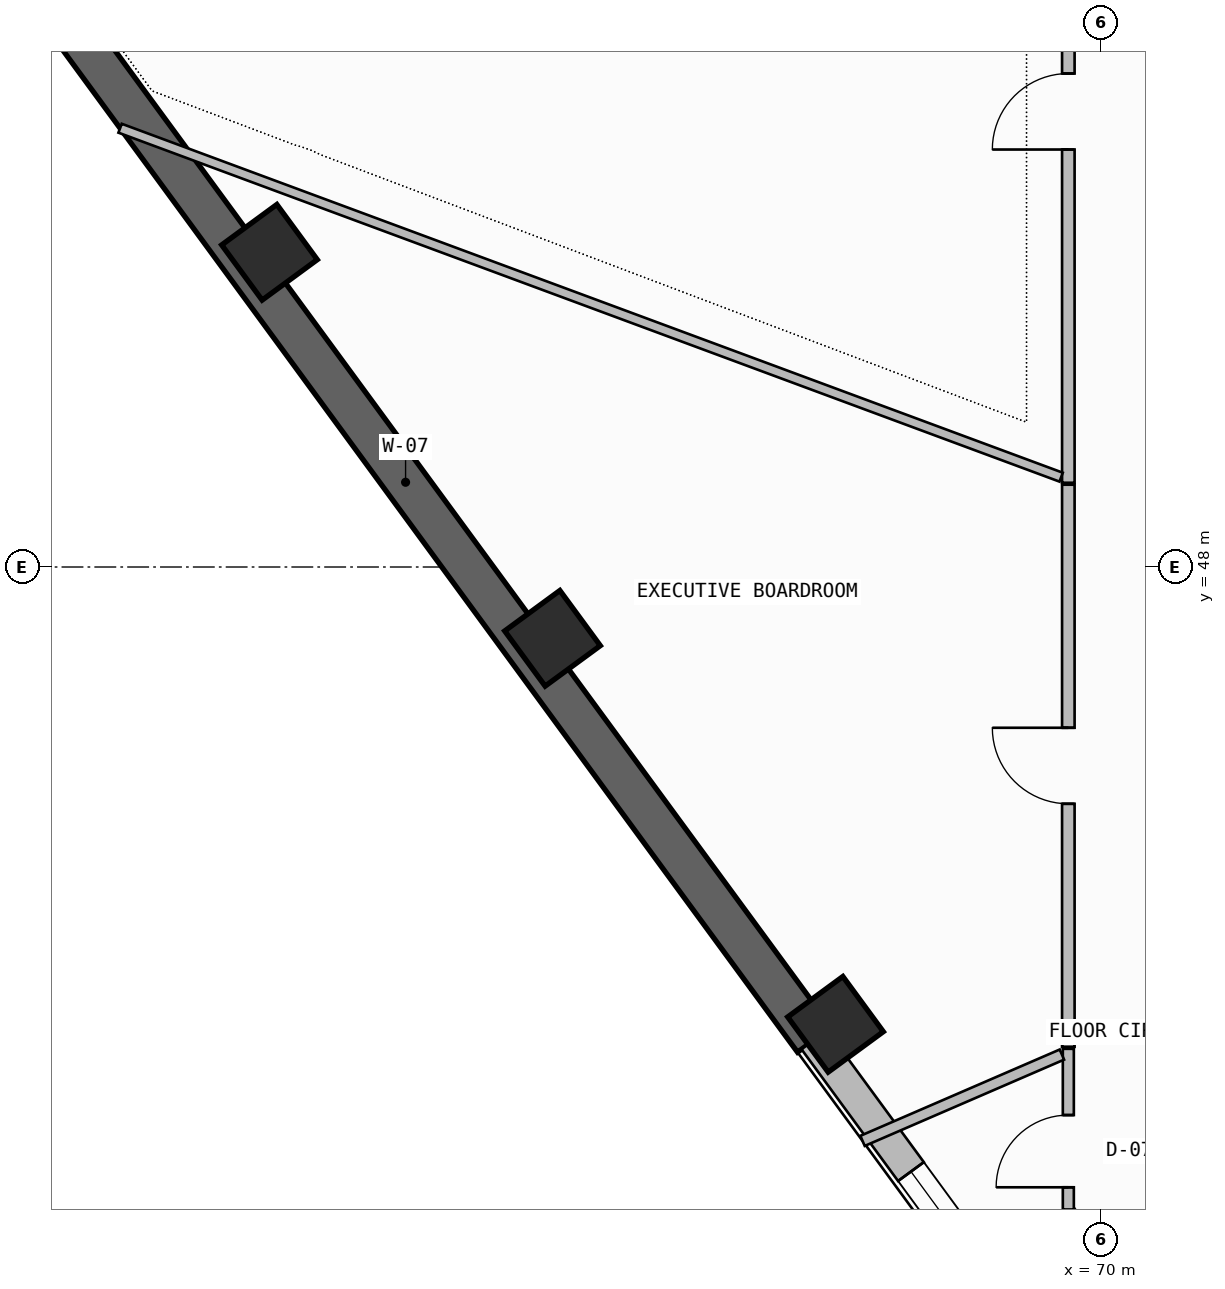
"""IFC4 building model, lengths in metres.
Left out: names, types, materials, properties, quantities, classifications, styles, units other than length and angle.
Written with IfcOpenShell. Run it as: python <this file> out.ifc"""

import sys

from ifc_helpers import new_model, si_unit, direction, frame, frame_2d, origin, origin_2d, place, context, subcontext, project, spatial, rectangle, extrude, element, fill, save


model = new_model("IFC4")
c1 = context("Model", 3, precision=1e-05, world=origin(), true_north=direction((0.0, 1.0)))
c2 = subcontext(c1, "Body", "Model", "MODEL_VIEW")
j1 = project(units=[si_unit("LENGTHUNIT", "METRE"), si_unit("PLANEANGLEUNIT", "RADIAN")], contexts=[c1])
p1 = place(None, origin())
s1 = spatial("IfcSite", under=j1, at=p1, CompositionType="ELEMENT")
p2 = place(p1, origin())
s2 = spatial("IfcBuilding", under=s1, at=p2, CompositionType="ELEMENT")
p3 = place(p2, frame((0.0, 0.0, 250.18)))
s3 = spatial("IfcBuildingStorey", under=s2, at=p3, CompositionType="ELEMENT", Elevation=250.18)
for number, where, z_axis, x_axis in (
    (1, (59.063, 52.14, 0.0), (0.0, 0.0, 1.0), (-0.591, 0.806, 0.0)),
    (2, (62.787, 47.062, 0.0), (0.0, 0.0, 1.0), (-0.591, 0.806, 0.0)),
    (3, (66.51, 41.983, 0.0), (0.0, 0.0, 1.0), (-0.591, 0.806, 0.0)),
):
    element("IfcColumn", number, at=place(p3, frame(where, z_axis=z_axis, x_axis=x_axis)), inside=s3, PredefinedType="COLUMN", context=c2, shape_type="SweptSolid", body=[
        extrude(rectangle(XDim=0.9, YDim=0.9, at=origin_2d()), origin(), (0.0, 0.0, 1.0), 3.52),
    ])
p4 = place(p3, frame((55.475, 56.45, -0.26), z_axis=(0.0, 0.0, 1.0), x_axis=(0.591309555876, -0.806444672082, 0.0)))
e4 = element("IfcWall", 4, at=p4, inside=s3, PredefinedType="SHEAR", context=c2, shape_type="SweptSolid", body=[
    extrude(rectangle(XDim=18.192, YDim=0.55, at=frame_2d((9.096, 0.0))), origin(), (0.0, 0.0, 1.0), 3.52),
])
p5 = place(p3, frame((66.232, 41.779, 0.0), z_axis=(0.0, 0.0, 1.0), x_axis=(0.591309008949, -0.806445073105, 0.0)))
e5 = element("IfcWall", 5, at=p5, inside=s3, PredefinedType="SOLIDWALL", context=c2, shape_type="SweptSolid", body=[
    extrude(rectangle(XDim=8.908, YDim=0.42, at=frame_2d((4.454, 0.0))), origin(), (0.0, 0.0, 1.0), 2.645),
])
p6 = place(p5, frame((2.149, 0.0, 1.1)))
e6 = element("IfcOpeningElement", 6, at=p6, cuts=e5, PredefinedType="OPENING", context=c2, shape_type="SweptSolid", body=[
    extrude(rectangle(XDim=2.4, YDim=1.2, at=frame_2d((1.2, 0.6))), frame((0.0, 0.22, 0.0), z_axis=(0.0, -1.0, 0.0), x_axis=(1.0, 0.0, 0.0)), (0.0, 0.0, 1.0), 0.44),
])
p7 = place(p3, frame((69.573, 39.548, 0.0), z_axis=(0.0, 0.0, 1.0), x_axis=(0.591326331503, -0.806432371418, 0.0)))
e7 = element("IfcWall", 7, at=p7, inside=s3, PredefinedType="PARTITIONING", context=c2, shape_type="SweptSolid", body=[
    extrude(rectangle(XDim=2.835, YDim=0.145, at=frame_2d((1.417, 0.0))), origin(), (0.0, 0.0, 1.0), 3.26),
])
p8 = place(p3, frame((69.573, 41.661, 0.0), z_axis=(0.0, 0.0, 1.0), x_axis=(0.0, -1.0, 0.0)))
e8 = element("IfcWall", 8, at=p8, inside=s3, PredefinedType="PARTITIONING", context=c2, shape_type="SweptSolid", body=[
    extrude(rectangle(XDim=2.113, YDim=0.145, at=frame_2d((1.057, 0.0))), origin(), (0.0, 0.0, 1.0), 3.26),
])
p9 = place(p8, frame((0.872, 0.0, 0.0)))
e9 = element("IfcOpeningElement", 9, at=p9, cuts=e8, PredefinedType="OPENING", context=c2, shape_type="SweptSolid", body=[
    extrude(rectangle(XDim=0.95, YDim=2.15, at=frame_2d((0.475, 1.075))), frame((0.0, 0.083, 0.0), z_axis=(0.0, -1.0, 0.0), x_axis=(1.0, 0.0, 0.0)), (0.0, 0.0, 1.0), 0.165),
])
p10 = place(p3, frame((66.866, 40.45, 0.0), z_axis=(0.0, 0.0, 1.0), x_axis=(0.917703061547, 0.397267027109, 0.0)))
e10 = element("IfcWall", 10, at=p10, inside=s3, PredefinedType="PARTITIONING", context=c2, shape_type="SweptSolid", body=[
    extrude(rectangle(XDim=2.858, YDim=0.145, at=frame_2d((1.429, 0.0))), origin(), (0.0, 0.0, 1.0), 3.26),
])
p11 = place(p3, frame((69.573, 58.876, 0.0), z_axis=(0.0, 0.0, 1.0), x_axis=(0.0, -1.0, 0.0)))
e11 = element("IfcWall", 11, at=p11, inside=s3, PredefinedType="PARTITIONING", context=c2, shape_type="SweptSolid", body=[
    extrude(rectangle(XDim=9.768, YDim=0.165, at=frame_2d((4.884, 0.0))), origin(), (0.0, 0.0, 1.0), 2.745),
])
p12 = place(p11, frame((4.384, 0.0, 0.0)))
e12 = element("IfcOpeningElement", 12, at=p12, cuts=e11, PredefinedType="OPENING", context=c2, shape_type="SweptSolid", body=[
    extrude(rectangle(XDim=1.0, YDim=2.2, at=frame_2d((0.5, 1.1))), frame((0.0, 0.093, 0.0), z_axis=(0.0, -1.0, 0.0), x_axis=(1.0, 0.0, 0.0)), (0.0, 0.0, 1.0), 0.185),
])
p13 = place(p3, frame((69.479, 49.182, 0.0), z_axis=(0.0, 0.0, 1.0), x_axis=(-0.937624257071, 0.347650330868, 0.0)))
e13 = element("IfcWall", 13, at=p13, inside=s3, PredefinedType="PARTITIONING", context=c2, shape_type="SweptSolid", body=[
    extrude(rectangle(XDim=13.205, YDim=0.125, at=frame_2d((6.603, 0.0))), origin(), (0.0, 0.0, 1.0), 2.645),
])
p14 = place(p3, frame((69.573, 49.083, 0.0), z_axis=(0.0, 0.0, 1.0), x_axis=(0.0, -1.0, 0.0)))
e14 = element("IfcWall", 14, at=p14, inside=s3, PredefinedType="PARTITIONING", context=c2, shape_type="SweptSolid", body=[
    extrude(rectangle(XDim=7.396, YDim=0.165, at=frame_2d((3.698, 0.0))), origin(), (0.0, 0.0, 1.0), 3.26),
])
p15 = place(p14, frame((3.198, 0.0, 0.0)))
e15 = element("IfcOpeningElement", 15, at=p15, cuts=e14, PredefinedType="OPENING", context=c2, shape_type="SweptSolid", body=[
    extrude(rectangle(XDim=1.0, YDim=2.2, at=frame_2d((0.5, 1.1))), frame((0.0, 0.093, 0.0), z_axis=(0.0, -1.0, 0.0), x_axis=(1.0, 0.0, 0.0)), (0.0, 0.0, 1.0), 0.185),
])
p16 = place(p6, origin())
e16 = element("IfcWindow", 16, at=p16, inside=s3, PartitioningType="SINGLE_PANEL", PredefinedType="WINDOW", context=c2, shape_type="SweptSolid", body=[
    extrude(rectangle(XDim=2.4, YDim=1.2, at=frame_2d((1.2, 0.6))), frame((0.0, 0.03, 0.0), z_axis=(0.0, -1.0, 0.0), x_axis=(1.0, 0.0, 0.0)), (0.0, 0.0, 1.0), 0.06),
])
fill(e6, e16)
p17 = place(p9, frame((0.95, 0.0, 0.0), z_axis=(0.0, 0.0, 1.0), x_axis=(-1.0, 0.0, 0.0)))
e17 = element("IfcDoor", 17, at=p17, inside=s3, OperationType="SINGLE_SWING_LEFT", PredefinedType="DOOR", context=c2, shape_type="SweptSolid", body=[
    extrude(rectangle(XDim=0.95, YDim=2.15, at=frame_2d((0.475, 1.075))), frame((0.0, 0.025, 0.0), z_axis=(0.0, -1.0, 0.0), x_axis=(1.0, 0.0, 0.0)), (0.0, 0.0, 1.0), 0.05),
])
fill(e9, e17)
p18 = place(p12, frame((1.0, 0.0, 0.0), z_axis=(0.0, 0.0, 1.0), x_axis=(-1.0, 0.0, 0.0)))
e18 = element("IfcDoor", 18, at=p18, inside=s3, OperationType="SINGLE_SWING_LEFT", PredefinedType="DOOR", context=c2, shape_type="SweptSolid", body=[
    extrude(rectangle(XDim=1.0, YDim=2.2, at=frame_2d((0.5, 1.1))), frame((0.0, 0.025, 0.0), z_axis=(0.0, -1.0, 0.0), x_axis=(1.0, 0.0, 0.0)), (0.0, 0.0, 1.0), 0.05),
])
fill(e12, e18)
p19 = place(p15, frame((1.0, 0.0, 0.0), z_axis=(0.0, 0.0, 1.0), x_axis=(-1.0, 0.0, 0.0)))
e19 = element("IfcDoor", 19, at=p19, inside=s3, OperationType="SINGLE_SWING_RIGHT", PredefinedType="DOOR", context=c2, shape_type="SweptSolid", body=[
    extrude(rectangle(XDim=1.0, YDim=2.2, at=frame_2d((0.5, 1.1))), frame((0.0, 0.025, 0.0), z_axis=(0.0, -1.0, 0.0), x_axis=(1.0, 0.0, 0.0)), (0.0, 0.0, 1.0), 0.05),
])
fill(e15, e19)
save(model, sys.argv[1])
